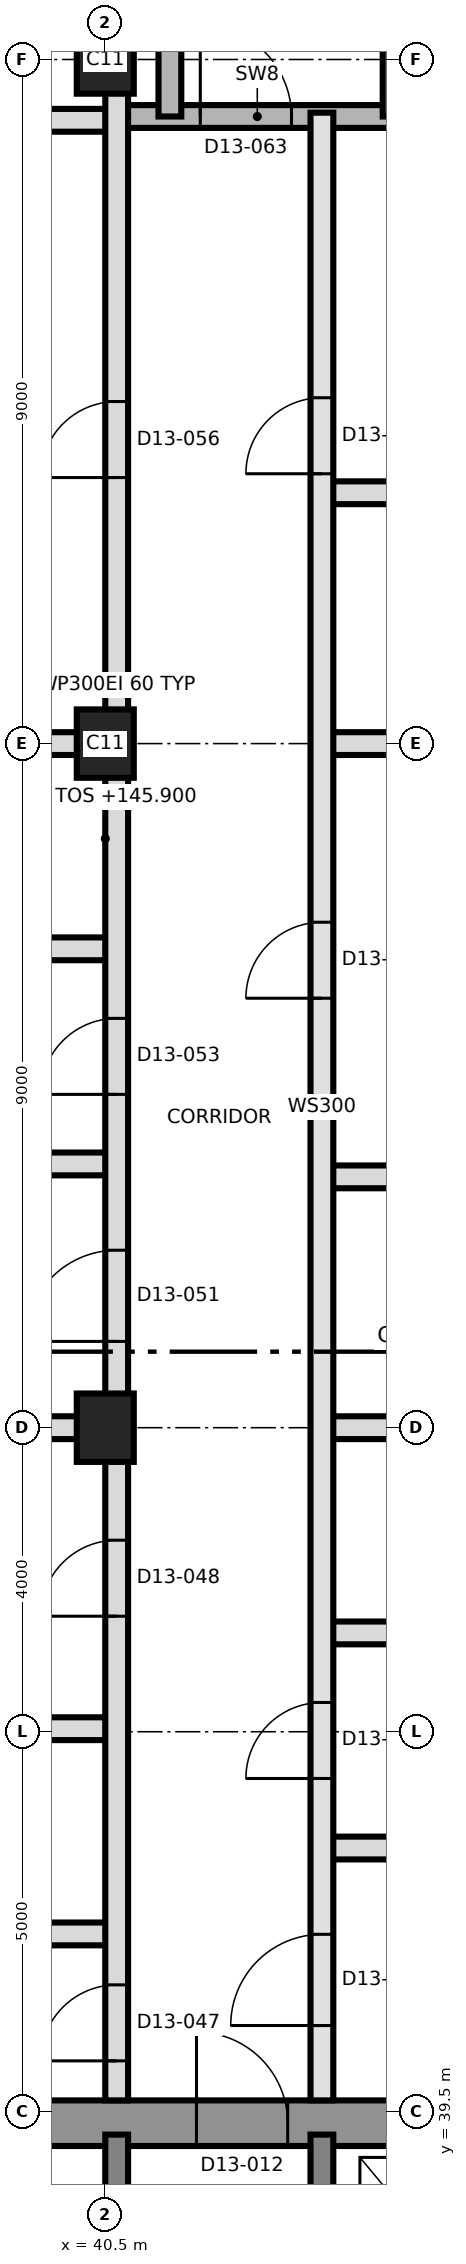
"""IFC4 building model, lengths in metres.
Left out: names, types, materials, properties, quantities, classifications, styles, units other than length and angle.
Written with IfcOpenShell. Run it as: python <this file> out.ifc"""

import sys

from ifc_helpers import new_model, si_unit, direction, frame, frame_2d, origin, origin_2d, place, context, subcontext, project, spatial, rectangle, extrude, element, fill, save


model = new_model("IFC4")
c1 = context("Model", 3, precision=1e-05, world=origin(), true_north=direction((0.0, 1.0)))
c2 = subcontext(c1, "Body", "Model", "MODEL_VIEW")
j1 = project(units=[si_unit("LENGTHUNIT", "METRE"), si_unit("PLANEANGLEUNIT", "RADIAN")], contexts=[c1])
p1 = place(None, origin())
s1 = spatial("IfcSite", under=j1, at=p1, CompositionType="ELEMENT")
p2 = place(p1, origin())
s2 = spatial("IfcBuilding", under=s1, at=p2, CompositionType="ELEMENT")
p3 = place(p2, frame((0.0, 0.0, 145.9)))
s3 = spatial("IfcBuildingStorey", under=s2, at=p3, CompositionType="ELEMENT", Elevation=145.9)
p4 = place(p3, frame((31.2, 39.35, 0.0), z_axis=(0.0, 0.0, 1.0), x_axis=(1.0, 0.0, 0.0)))
e1 = element("IfcWall", 1, at=p4, inside=s3, PredefinedType="SHEAR", context=c2, shape_type="SweptSolid", body=[
    extrude(rectangle(XDim=27.0, YDim=0.6, at=frame_2d((13.5, 0.0))), origin(), (0.0, 0.0, 1.0), 3.7),
])
p5 = place(p4, frame((10.5, 0.0, 0.0)))
e2 = element("IfcOpeningElement", 2, at=p5, cuts=e1, PredefinedType="OPENING", context=c2, shape_type="SweptSolid", body=[
    extrude(rectangle(XDim=1.2, YDim=2.1, at=frame_2d((0.6, 1.05))), frame((0.0, 0.31, 0.0), z_axis=(0.0, -1.0, 0.0), x_axis=(1.0, 0.0, 0.0)), (0.0, 0.0, 1.0), 0.62),
])
for number, where, z_axis, x_axis in (
    (3, (40.65, 33.5, 0.0), (0.0, 0.0, 1.0), (0.0, 1.0, 0.0)),
    (4, (43.35, 33.5, 0.0), (0.0, 0.0, 1.0), (0.0, 1.0, 0.0)),
):
    element("IfcWall", number, at=place(p3, frame(where, z_axis=z_axis, x_axis=x_axis)), inside=s3, PredefinedType="SHEAR", context=c2, shape_type="SweptSolid", body=[
        extrude(rectangle(XDim=5.7, YDim=0.3, at=frame_2d((2.85, 0.0))), origin(), (0.0, 0.0, 1.0), 3.7),
    ])
for number, where, z_axis, x_axis in (
    (5, (40.5, 48.5, 0.0), (0.0, 0.0, 1.0), (0.0, 1.0, 0.0)),
    (6, (40.5, 57.5, 0.0), (0.0, 0.0, 1.0), (0.0, 1.0, 0.0)),
    (7, (40.5, 66.5, 0.0), (0.0, 0.0, 1.0), (0.0, 1.0, 0.0)),
):
    element("IfcColumn", number, at=place(p3, frame(where, z_axis=z_axis, x_axis=x_axis)), inside=s3, PredefinedType="COLUMN", context=c2, shape_type="SweptSolid", body=[
        extrude(rectangle(XDim=0.9, YDim=0.75, at=origin_2d()), origin(), (0.0, 0.0, 1.0), 3.7),
    ])
p6 = place(p3, frame((37.45, 41.84, 0.0), z_axis=(0.0, 0.0, 1.0), x_axis=(1.0, 0.0, 0.0)))
e8 = element("IfcWall", 8, at=p6, inside=s3, PredefinedType="PARTITIONING", context=c2, shape_type="SweptSolid", body=[
    extrude(rectangle(XDim=3.2, YDim=0.3, at=frame_2d((1.6, 0.0))), origin(), (0.0, 0.0, 1.0), 3.4),
])
p7 = place(p3, frame((43.35, 42.97, 0.0), z_axis=(0.0, 0.0, 1.0), x_axis=(1.0, 0.0, 0.0)))
e9 = element("IfcWall", 9, at=p7, inside=s3, PredefinedType="PARTITIONING", context=c2, shape_type="SweptSolid", body=[
    extrude(rectangle(XDim=8.402, YDim=0.3, at=frame_2d((4.201, 0.0))), origin(), (0.0, 0.0, 1.0), 3.4),
])
p8 = place(p3, frame((30.35, 44.54, 0.0), z_axis=(0.0, 0.0, 1.0), x_axis=(1.0, 0.0, 0.0)))
e10 = element("IfcWall", 10, at=p8, inside=s3, PredefinedType="PARTITIONING", context=c2, shape_type="SweptSolid", body=[
    extrude(rectangle(XDim=10.3, YDim=0.3, at=frame_2d((5.15, 0.0))), origin(), (0.0, 0.0, 1.0), 3.4),
])
p9 = place(p3, frame((43.35, 45.8, 0.0), z_axis=(0.0, 0.0, 1.0), x_axis=(1.0, 0.0, 0.0)))
e11 = element("IfcWall", 11, at=p9, inside=s3, PredefinedType="PARTITIONING", context=c2, shape_type="SweptSolid", body=[
    extrude(rectangle(XDim=3.2, YDim=0.3, at=frame_2d((1.6, 0.0))), origin(), (0.0, 0.0, 1.0), 3.4),
])
p10 = place(p3, frame((30.35, 48.5, 0.0), z_axis=(0.0, 0.0, 1.0), x_axis=(1.0, 0.0, 0.0)))
e12 = element("IfcWall", 12, at=p10, inside=s3, PredefinedType="PARTITIONING", context=c2, shape_type="SweptSolid", body=[
    extrude(rectangle(XDim=10.3, YDim=0.3, at=frame_2d((5.15, 0.0))), origin(), (0.0, 0.0, 1.0), 3.4),
])
p11 = place(p3, frame((43.35, 48.5, 0.0), z_axis=(0.0, 0.0, 1.0), x_axis=(1.0, 0.0, 0.0)))
e13 = element("IfcWall", 13, at=p11, inside=s3, PredefinedType="PARTITIONING", context=c2, shape_type="SweptSolid", body=[
    extrude(rectangle(XDim=7.48, YDim=0.3, at=frame_2d((3.74, 0.0))), origin(), (0.0, 0.0, 1.0), 3.4),
])
p12 = place(p3, frame((43.35, 51.8, 0.0), z_axis=(0.0, 0.0, 1.0), x_axis=(1.0, 0.0, 0.0)))
e14 = element("IfcWall", 14, at=p12, inside=s3, PredefinedType="PARTITIONING", context=c2, shape_type="SweptSolid", body=[
    extrude(rectangle(XDim=3.5, YDim=0.3, at=frame_2d((1.75, 0.0))), origin(), (0.0, 0.0, 1.0), 3.4),
])
p13 = place(p3, frame((30.35, 51.97, 0.0), z_axis=(0.0, 0.0, 1.0), x_axis=(1.0, 0.0, 0.0)))
e15 = element("IfcWall", 15, at=p13, inside=s3, PredefinedType="PARTITIONING", context=c2, shape_type="SweptSolid", body=[
    extrude(rectangle(XDim=10.3, YDim=0.3, at=frame_2d((5.15, 0.0))), origin(), (0.0, 0.0, 1.0), 3.4),
])
p14 = place(p3, frame((37.45, 54.8, 0.0), z_axis=(0.0, 0.0, 1.0), x_axis=(1.0, 0.0, 0.0)))
e16 = element("IfcWall", 16, at=p14, inside=s3, PredefinedType="PARTITIONING", context=c2, shape_type="SweptSolid", body=[
    extrude(rectangle(XDim=3.2, YDim=0.3, at=frame_2d((1.6, 0.0))), origin(), (0.0, 0.0, 1.0), 3.4),
])
p15 = place(p3, frame((30.35, 57.5, 0.0), z_axis=(0.0, 0.0, 1.0), x_axis=(1.0, 0.0, 0.0)))
e17 = element("IfcWall", 17, at=p15, inside=s3, PredefinedType="PARTITIONING", context=c2, shape_type="SweptSolid", body=[
    extrude(rectangle(XDim=10.3, YDim=0.3, at=frame_2d((5.15, 0.0))), origin(), (0.0, 0.0, 1.0), 3.4),
])
p16 = place(p3, frame((43.35, 57.5, 0.0), z_axis=(0.0, 0.0, 1.0), x_axis=(1.0, 0.0, 0.0)))
e18 = element("IfcWall", 18, at=p16, inside=s3, PredefinedType="PARTITIONING", context=c2, shape_type="SweptSolid", body=[
    extrude(rectangle(XDim=7.48, YDim=0.3, at=frame_2d((3.74, 0.0))), origin(), (0.0, 0.0, 1.0), 3.4),
])
p17 = place(p3, frame((43.35, 60.8, 0.0), z_axis=(0.0, 0.0, 1.0), x_axis=(1.0, 0.0, 0.0)))
e19 = element("IfcWall", 19, at=p17, inside=s3, PredefinedType="PARTITIONING", context=c2, shape_type="SweptSolid", body=[
    extrude(rectangle(XDim=3.5, YDim=0.3, at=frame_2d((1.75, 0.0))), origin(), (0.0, 0.0, 1.0), 3.4),
])
p18 = place(p3, frame((30.35, 65.7, 0.0), z_axis=(0.0, 0.0, 1.0), x_axis=(1.0, 0.0, 0.0)))
e20 = element("IfcWall", 20, at=p18, inside=s3, PredefinedType="PARTITIONING", context=c2, shape_type="SweptSolid", body=[
    extrude(rectangle(XDim=10.3, YDim=0.3, at=frame_2d((5.15, 0.0))), origin(), (0.0, 0.0, 1.0), 3.4),
])
p19 = place(p18, frame((4.65, 0.0, 0.0)))
e21 = element("IfcOpeningElement", 21, at=p19, cuts=e20, PredefinedType="OPENING", context=c2, shape_type="SweptSolid", body=[
    extrude(rectangle(XDim=1.0, YDim=2.1, at=frame_2d((0.5, 1.05))), frame((0.0, 0.16, 0.0), z_axis=(0.0, -1.0, 0.0), x_axis=(1.0, 0.0, 0.0)), (0.0, 0.0, 1.0), 0.32),
])
p20 = place(p3, frame((40.65, 65.75, 0.0), z_axis=(0.0, 0.0, 1.0), x_axis=(1.0, 0.0, 0.0)))
e22 = element("IfcWall", 22, at=p20, inside=s3, PredefinedType="SHEAR", context=c2, shape_type="SweptSolid", body=[
    extrude(rectangle(XDim=3.7, YDim=0.3, at=frame_2d((1.85, 0.0))), origin(), (0.0, 0.0, 1.0), 3.4),
])
p21 = place(p20, frame((1.1, 0.0, 0.0)))
e23 = element("IfcOpeningElement", 23, at=p21, cuts=e22, PredefinedType="OPENING", context=c2, shape_type="SweptSolid", body=[
    extrude(rectangle(XDim=1.2, YDim=2.1, at=frame_2d((0.6, 1.05))), frame((0.0, 0.16, 0.0), z_axis=(0.0, -1.0, 0.0), x_axis=(1.0, 0.0, 0.0)), (0.0, 0.0, 1.0), 0.32),
])
p22 = place(p3, frame((40.65, 39.65, 0.0), z_axis=(0.0, 0.0, 1.0), x_axis=(0.0, 1.0, 0.0)))
e24 = element("IfcWall", 24, at=p22, inside=s3, PredefinedType="PARTITIONING", context=c2, shape_type="SweptSolid", body=[
    extrude(rectangle(XDim=37.24, YDim=0.3, at=frame_2d((18.62, 0.0))), origin(), (0.0, 0.0, 1.0), 3.4),
])
p23 = place(p22, frame((0.52, 0.0, 0.0)))
e25 = element("IfcOpeningElement", 25, at=p23, cuts=e24, PredefinedType="OPENING", context=c2, shape_type="SweptSolid", body=[
    extrude(rectangle(XDim=1.0, YDim=2.1, at=frame_2d((0.5, 1.05))), frame((0.0, 0.16, 0.0), z_axis=(0.0, -1.0, 0.0), x_axis=(1.0, 0.0, 0.0)), (0.0, 0.0, 1.0), 0.32),
])
p24 = place(p22, frame((6.37, 0.0, 0.0)))
e26 = element("IfcOpeningElement", 26, at=p24, cuts=e24, PredefinedType="OPENING", context=c2, shape_type="SweptSolid", body=[
    extrude(rectangle(XDim=1.0, YDim=2.1, at=frame_2d((0.5, 1.05))), frame((0.0, 0.16, 0.0), z_axis=(0.0, -1.0, 0.0), x_axis=(1.0, 0.0, 0.0)), (0.0, 0.0, 1.0), 0.32),
])
p25 = place(p22, frame((9.985, 0.0, 0.0)))
e27 = element("IfcOpeningElement", 27, at=p25, cuts=e24, PredefinedType="OPENING", context=c2, shape_type="SweptSolid", body=[
    extrude(rectangle(XDim=1.2, YDim=2.1, at=frame_2d((0.6, 1.05))), frame((0.0, 0.16, 0.0), z_axis=(0.0, -1.0, 0.0), x_axis=(1.0, 0.0, 0.0)), (0.0, 0.0, 1.0), 0.32),
])
p26 = place(p22, frame((13.235, 0.0, 0.0)))
e28 = element("IfcOpeningElement", 28, at=p26, cuts=e24, PredefinedType="OPENING", context=c2, shape_type="SweptSolid", body=[
    extrude(rectangle(XDim=1.0, YDim=2.1, at=frame_2d((0.5, 1.05))), frame((0.0, 0.16, 0.0), z_axis=(0.0, -1.0, 0.0), x_axis=(1.0, 0.0, 0.0)), (0.0, 0.0, 1.0), 0.32),
])
p27 = place(p22, frame((21.35, 0.0, 0.0)))
e29 = element("IfcOpeningElement", 29, at=p27, cuts=e24, PredefinedType="OPENING", context=c2, shape_type="SweptSolid", body=[
    extrude(rectangle(XDim=1.0, YDim=2.4, at=frame_2d((0.5, 1.2))), frame((0.0, 0.16, 0.0), z_axis=(0.0, -1.0, 0.0), x_axis=(1.0, 0.0, 0.0)), (0.0, 0.0, 1.0), 0.32),
])
p28 = place(p3, frame((41.35, 65.75, 0.0), z_axis=(0.0, 0.0, 1.0), x_axis=(0.0, 1.0, 0.0)))
e30 = element("IfcWall", 30, at=p28, inside=s3, PredefinedType="SHEAR", context=c2, shape_type="SweptSolid", body=[
    extrude(rectangle(XDim=8.85, YDim=0.3, at=frame_2d((4.425, 0.0))), origin(), (0.0, 0.0, 1.0), 3.4),
])
p29 = place(p3, frame((43.35, 39.65, 0.0), z_axis=(0.0, 0.0, 1.0), x_axis=(0.0, 1.0, 0.0)))
e31 = element("IfcWall", 31, at=p29, inside=s3, PredefinedType="SOLIDWALL", context=c2, shape_type="SweptSolid", body=[
    extrude(rectangle(XDim=26.15, YDim=0.3, at=frame_2d((13.075, 0.0))), origin(), (0.0, 0.0, 1.0), 3.4),
])
p30 = place(p29, frame((0.985, 0.0, 0.0)))
e32 = element("IfcOpeningElement", 32, at=p30, cuts=e31, PredefinedType="OPENING", context=c2, shape_type="SweptSolid", body=[
    extrude(rectangle(XDim=1.2, YDim=2.1, at=frame_2d((0.6, 1.05))), frame((0.0, 0.16, 0.0), z_axis=(0.0, -1.0, 0.0), x_axis=(1.0, 0.0, 0.0)), (0.0, 0.0, 1.0), 0.32),
])
p31 = place(p29, frame((4.235, 0.0, 0.0)))
e33 = element("IfcOpeningElement", 33, at=p31, cuts=e31, PredefinedType="OPENING", context=c2, shape_type="SweptSolid", body=[
    extrude(rectangle(XDim=1.0, YDim=2.1, at=frame_2d((0.5, 1.05))), frame((0.0, 0.16, 0.0), z_axis=(0.0, -1.0, 0.0), x_axis=(1.0, 0.0, 0.0)), (0.0, 0.0, 1.0), 0.32),
])
p32 = place(p29, frame((14.5, 0.0, 0.0)))
e34 = element("IfcOpeningElement", 34, at=p32, cuts=e31, PredefinedType="OPENING", context=c2, shape_type="SweptSolid", body=[
    extrude(rectangle(XDim=1.0, YDim=2.4, at=frame_2d((0.5, 1.2))), frame((0.0, 0.16, 0.0), z_axis=(0.0, -1.0, 0.0), x_axis=(1.0, 0.0, 0.0)), (0.0, 0.0, 1.0), 0.32),
])
p33 = place(p29, frame((21.4, 0.0, 0.0)))
e35 = element("IfcOpeningElement", 35, at=p33, cuts=e31, PredefinedType="OPENING", context=c2, shape_type="SweptSolid", body=[
    extrude(rectangle(XDim=1.0, YDim=2.4, at=frame_2d((0.5, 1.2))), frame((0.0, 0.16, 0.0), z_axis=(0.0, -1.0, 0.0), x_axis=(1.0, 0.0, 0.0)), (0.0, 0.0, 1.0), 0.32),
])
p34 = place(p3, frame((44.3, 65.75, 0.0), z_axis=(0.0, 0.0, 1.0), x_axis=(0.0, 1.0, 0.0)))
e36 = element("IfcWall", 36, at=p34, inside=s3, PredefinedType="SHEAR", context=c2, shape_type="SweptSolid", body=[
    extrude(rectangle(XDim=8.85, YDim=0.3, at=frame_2d((4.425, 0.0))), origin(), (0.0, 0.0, 1.0), 3.4),
])
p35 = place(p5, origin())
e37 = element("IfcDoor", 37, at=p35, inside=s3, OperationType="SINGLE_SWING_RIGHT", PredefinedType="DOOR", context=c2, shape_type="SweptSolid", body=[
    extrude(rectangle(XDim=1.2, YDim=2.1, at=frame_2d((0.6, 1.05))), frame((0.0, 0.025, 0.0), z_axis=(0.0, -1.0, 0.0), x_axis=(1.0, 0.0, 0.0)), (0.0, 0.0, 1.0), 0.05),
])
fill(e2, e37)
p36 = place(p30, origin())
e38 = element("IfcDoor", 38, at=p36, inside=s3, OperationType="SINGLE_SWING_RIGHT", PredefinedType="DOOR", context=c2, shape_type="SweptSolid", body=[
    extrude(rectangle(XDim=1.2, YDim=2.1, at=frame_2d((0.6, 1.05))), frame((0.0, 0.025, 0.0), z_axis=(0.0, -1.0, 0.0), x_axis=(1.0, 0.0, 0.0)), (0.0, 0.0, 1.0), 0.05),
])
fill(e32, e38)
p37 = place(p31, origin())
e39 = element("IfcDoor", 39, at=p37, inside=s3, OperationType="SINGLE_SWING_LEFT", PredefinedType="DOOR", context=c2, shape_type="SweptSolid", body=[
    extrude(rectangle(XDim=1.0, YDim=2.1, at=frame_2d((0.5, 1.05))), frame((0.0, 0.025, 0.0), z_axis=(0.0, -1.0, 0.0), x_axis=(1.0, 0.0, 0.0)), (0.0, 0.0, 1.0), 0.05),
])
fill(e33, e39)
p38 = place(p23, origin())
e40 = element("IfcDoor", 40, at=p38, inside=s3, OperationType="SINGLE_SWING_RIGHT", PredefinedType="DOOR", context=c2, shape_type="SweptSolid", body=[
    extrude(rectangle(XDim=1.0, YDim=2.1, at=frame_2d((0.5, 1.05))), frame((0.0, 0.025, 0.0), z_axis=(0.0, -1.0, 0.0), x_axis=(1.0, 0.0, 0.0)), (0.0, 0.0, 1.0), 0.05),
])
fill(e25, e40)
p39 = place(p24, origin())
e41 = element("IfcDoor", 41, at=p39, inside=s3, OperationType="SINGLE_SWING_LEFT", PredefinedType="DOOR", context=c2, shape_type="SweptSolid", body=[
    extrude(rectangle(XDim=1.0, YDim=2.1, at=frame_2d((0.5, 1.05))), frame((0.0, 0.025, 0.0), z_axis=(0.0, -1.0, 0.0), x_axis=(1.0, 0.0, 0.0)), (0.0, 0.0, 1.0), 0.05),
])
fill(e26, e41)
p40 = place(p32, origin())
e42 = element("IfcDoor", 42, at=p40, inside=s3, OperationType="SINGLE_SWING_RIGHT", PredefinedType="DOOR", context=c2, shape_type="SweptSolid", body=[
    extrude(rectangle(XDim=1.0, YDim=2.4, at=frame_2d((0.5, 1.2))), frame((0.0, 0.025, 0.0), z_axis=(0.0, -1.0, 0.0), x_axis=(1.0, 0.0, 0.0)), (0.0, 0.0, 1.0), 0.05),
])
fill(e34, e42)
p41 = place(p25, origin())
e43 = element("IfcDoor", 43, at=p41, inside=s3, OperationType="SINGLE_SWING_LEFT", PredefinedType="DOOR", context=c2, shape_type="SweptSolid", body=[
    extrude(rectangle(XDim=1.2, YDim=2.1, at=frame_2d((0.6, 1.05))), frame((0.0, 0.025, 0.0), z_axis=(0.0, -1.0, 0.0), x_axis=(1.0, 0.0, 0.0)), (0.0, 0.0, 1.0), 0.05),
])
fill(e27, e43)
p42 = place(p26, origin())
e44 = element("IfcDoor", 44, at=p42, inside=s3, OperationType="SINGLE_SWING_RIGHT", PredefinedType="DOOR", context=c2, shape_type="SweptSolid", body=[
    extrude(rectangle(XDim=1.0, YDim=2.1, at=frame_2d((0.5, 1.05))), frame((0.0, 0.025, 0.0), z_axis=(0.0, -1.0, 0.0), x_axis=(1.0, 0.0, 0.0)), (0.0, 0.0, 1.0), 0.05),
])
fill(e28, e44)
p43 = place(p33, origin())
e45 = element("IfcDoor", 45, at=p43, inside=s3, OperationType="SINGLE_SWING_LEFT", PredefinedType="DOOR", context=c2, shape_type="SweptSolid", body=[
    extrude(rectangle(XDim=1.0, YDim=2.4, at=frame_2d((0.5, 1.2))), frame((0.0, 0.025, 0.0), z_axis=(0.0, -1.0, 0.0), x_axis=(1.0, 0.0, 0.0)), (0.0, 0.0, 1.0), 0.05),
])
fill(e35, e45)
p44 = place(p27, origin())
e46 = element("IfcDoor", 46, at=p44, inside=s3, OperationType="SINGLE_SWING_LEFT", PredefinedType="DOOR", context=c2, shape_type="SweptSolid", body=[
    extrude(rectangle(XDim=1.0, YDim=2.4, at=frame_2d((0.5, 1.2))), frame((0.0, 0.025, 0.0), z_axis=(0.0, -1.0, 0.0), x_axis=(1.0, 0.0, 0.0)), (0.0, 0.0, 1.0), 0.05),
])
fill(e29, e46)
p45 = place(p21, origin())
e47 = element("IfcDoor", 47, at=p45, inside=s3, OperationType="SINGLE_SWING_RIGHT", PredefinedType="DOOR", context=c2, shape_type="SweptSolid", body=[
    extrude(rectangle(XDim=1.2, YDim=2.1, at=frame_2d((0.6, 1.05))), frame((0.0, 0.025, 0.0), z_axis=(0.0, -1.0, 0.0), x_axis=(1.0, 0.0, 0.0)), (0.0, 0.0, 1.0), 0.05),
])
fill(e23, e47)
save(model, sys.argv[1])
